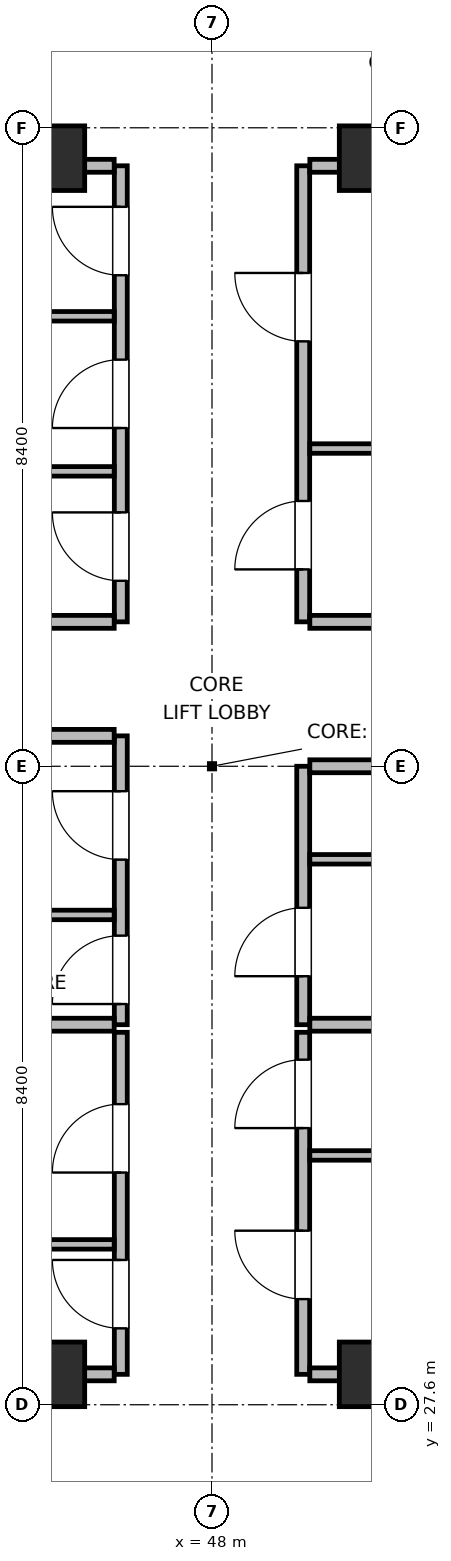
"""IFC4 building model, lengths in metres.
Left out: names, types, materials, properties, quantities, classifications, styles, units other than length and angle.
Written with IfcOpenShell. Run it as: python <this file> out.ifc"""

import sys

from ifc_helpers import new_model, si_unit, direction, frame, frame_2d, origin, origin_2d, place, context, subcontext, project, spatial, rectangle, extrude, element, fill, save


model = new_model("IFC4")
c1 = context("Model", 3, precision=1e-05, world=origin(), true_north=direction((0.0, 1.0)))
c2 = subcontext(c1, "Body", "Model", "MODEL_VIEW")
j1 = project(units=[si_unit("LENGTHUNIT", "METRE"), si_unit("PLANEANGLEUNIT", "RADIAN")], contexts=[c1])
p1 = place(None, origin())
s1 = spatial("IfcSite", under=j1, at=p1, CompositionType="ELEMENT")
p2 = place(p1, origin())
s2 = spatial("IfcBuilding", under=s1, at=p2, CompositionType="ELEMENT")
p3 = place(p2, frame((0.0, 0.0, 270.6)))
s3 = spatial("IfcBuildingStorey", under=s2, at=p3, CompositionType="ELEMENT", Elevation=270.6)
for number, where, z_axis, x_axis in (
    (1, (45.9, 28.0, 0.0), (0.0, 0.0, 1.0), (1.0, 0.0, 0.0)),
    (2, (50.1, 28.0, 0.0), (0.0, 0.0, 1.0), (1.0, 0.0, 0.0)),
    (3, (45.9, 44.0, 0.0), (0.0, 0.0, 1.0), (1.0, 0.0, 0.0)),
    (4, (50.1, 44.0, 0.0), (0.0, 0.0, 1.0), (1.0, 0.0, 0.0)),
):
    element("IfcColumn", number, at=place(p3, frame(where, z_axis=z_axis, x_axis=x_axis)), inside=s3, PredefinedType="COLUMN", context=c2, shape_type="SweptSolid", body=[
        extrude(rectangle(XDim=0.85, YDim=0.85, at=origin_2d()), origin(), (0.0, 0.0, 1.0), 3.9),
    ])
p4 = place(p3, frame((46.8, 32.6, 0.0), z_axis=(0.0, 0.0, 1.0), x_axis=(0.0, 1.0, 0.0)))
e5 = element("IfcWall", 5, at=p4, inside=s3, PredefinedType="PARTITIONING", context=c2, shape_type="SweptSolid", body=[
    extrude(rectangle(XDim=3.8, YDim=0.17, at=frame_2d((1.9, 0.0))), origin(), (0.0, 0.0, 1.0), 3.68),
])
p5 = place(p4, frame((0.272, 0.0, 0.0)))
e6 = element("IfcOpeningElement", 6, at=p5, cuts=e5, PredefinedType="OPENING", context=c2, shape_type="SweptSolid", body=[
    extrude(rectangle(XDim=0.9, YDim=2.02, at=frame_2d((0.45, 1.01))), frame((0.0, 0.095, 0.0), z_axis=(0.0, -1.0, 0.0), x_axis=(1.0, 0.0, 0.0)), (0.0, 0.0, 1.0), 0.19),
])
p6 = place(p4, frame((2.172, 0.0, 0.0)))
e7 = element("IfcOpeningElement", 7, at=p6, cuts=e5, PredefinedType="OPENING", context=c2, shape_type="SweptSolid", body=[
    extrude(rectangle(XDim=0.9, YDim=2.02, at=frame_2d((0.45, 1.01))), frame((0.0, 0.095, 0.0), z_axis=(0.0, -1.0, 0.0), x_axis=(1.0, 0.0, 0.0)), (0.0, 0.0, 1.0), 0.19),
])
for number, where, z_axis, x_axis in (
    (8, (43.8, 32.6, 0.0), (0.0, 0.0, 1.0), (1.0, 0.0, 0.0)),
    (9, (43.8, 36.4, 0.0), (0.0, 0.0, 1.0), (1.0, 0.0, 0.0)),
):
    element("IfcWall", number, at=place(p3, frame(where, z_axis=z_axis, x_axis=x_axis)), inside=s3, PredefinedType="PARTITIONING", context=c2, shape_type="SweptSolid", body=[
        extrude(rectangle(XDim=2.913, YDim=0.17, at=frame_2d((1.457, 0.0))), origin(), (0.0, 0.0, 1.0), 3.68),
    ])
p7 = place(p3, frame((43.8, 34.044, 0.0), z_axis=(0.0, 0.0, 1.0), x_axis=(1.0, 0.0, 0.0)))
e10 = element("IfcWall", 10, at=p7, inside=s3, PredefinedType="PARTITIONING", context=c2, shape_type="SweptSolid", body=[
    extrude(rectangle(XDim=2.913, YDim=0.125, at=frame_2d((1.457, 0.0))), origin(), (0.0, 0.0, 1.0), 3.68),
])
p8 = place(p3, frame((49.2, 32.6, 0.0), z_axis=(0.0, 0.0, 1.0), x_axis=(0.0, 1.0, 0.0)))
e11 = element("IfcWall", 11, at=p8, inside=s3, PredefinedType="PARTITIONING", context=c2, shape_type="SweptSolid", body=[
    extrude(rectangle(XDim=3.4, YDim=0.17, at=frame_2d((1.7, 0.0))), origin(), (0.0, 0.0, 1.0), 3.68),
])
p9 = place(p8, frame((0.638, 0.0, 0.0)))
e12 = element("IfcOpeningElement", 12, at=p9, cuts=e11, PredefinedType="OPENING", context=c2, shape_type="SweptSolid", body=[
    extrude(rectangle(XDim=0.9, YDim=2.02, at=frame_2d((0.45, 1.01))), frame((0.0, 0.095, 0.0), z_axis=(0.0, -1.0, 0.0), x_axis=(1.0, 0.0, 0.0)), (0.0, 0.0, 1.0), 0.19),
])
for number, where, z_axis, x_axis in (
    (13, (49.287, 32.6, 0.0), (0.0, 0.0, 1.0), (1.0, 0.0, 0.0)),
    (14, (49.287, 36.0, 0.0), (0.0, 0.0, 1.0), (1.0, 0.0, 0.0)),
):
    element("IfcWall", number, at=place(p3, frame(where, z_axis=z_axis, x_axis=x_axis)), inside=s3, PredefinedType="PARTITIONING", context=c2, shape_type="SweptSolid", body=[
        extrude(rectangle(XDim=2.913, YDim=0.17, at=frame_2d((1.457, 0.0))), origin(), (0.0, 0.0, 1.0), 3.68),
    ])
p10 = place(p3, frame((49.287, 34.776, 0.0), z_axis=(0.0, 0.0, 1.0), x_axis=(1.0, 0.0, 0.0)))
e15 = element("IfcWall", 15, at=p10, inside=s3, PredefinedType="PARTITIONING", context=c2, shape_type="SweptSolid", body=[
    extrude(rectangle(XDim=2.913, YDim=0.125, at=frame_2d((1.457, 0.0))), origin(), (0.0, 0.0, 1.0), 3.68),
])
p11 = place(p3, frame((46.8, 28.0, 0.0), z_axis=(0.0, 0.0, 1.0), x_axis=(0.0, 1.0, 0.0)))
e16 = element("IfcWall", 16, at=p11, inside=s3, PredefinedType="PARTITIONING", context=c2, shape_type="SweptSolid", body=[
    extrude(rectangle(XDim=4.5, YDim=0.17, at=frame_2d((2.25, 0.0))), origin(), (0.0, 0.0, 1.0), 3.68),
])
p12 = place(p11, frame((0.605, 0.0, 0.0)))
e17 = element("IfcOpeningElement", 17, at=p12, cuts=e16, PredefinedType="OPENING", context=c2, shape_type="SweptSolid", body=[
    extrude(rectangle(XDim=0.9, YDim=2.02, at=frame_2d((0.45, 1.01))), frame((0.0, 0.095, 0.0), z_axis=(0.0, -1.0, 0.0), x_axis=(1.0, 0.0, 0.0)), (0.0, 0.0, 1.0), 0.19),
])
p13 = place(p11, frame((2.655, 0.0, 0.0)))
e18 = element("IfcOpeningElement", 18, at=p13, cuts=e16, PredefinedType="OPENING", context=c2, shape_type="SweptSolid", body=[
    extrude(rectangle(XDim=0.9, YDim=2.02, at=frame_2d((0.45, 1.01))), frame((0.0, 0.095, 0.0), z_axis=(0.0, -1.0, 0.0), x_axis=(1.0, 0.0, 0.0)), (0.0, 0.0, 1.0), 0.19),
])
p14 = place(p3, frame((42.5, 28.0, 0.0), z_axis=(0.0, 0.0, 1.0), x_axis=(1.0, 0.0, 0.0)))
e19 = element("IfcWall", 19, at=p14, inside=s3, PredefinedType="PARTITIONING", context=c2, shape_type="SweptSolid", body=[
    extrude(rectangle(XDim=4.213, YDim=0.17, at=frame_2d((2.106, 0.0))), origin(), (0.0, 0.0, 1.0), 2.765),
])
p15 = place(p3, frame((42.5, 29.71, 0.0), z_axis=(0.0, 0.0, 1.0), x_axis=(1.0, 0.0, 0.0)))
e20 = element("IfcWall", 20, at=p15, inside=s3, PredefinedType="PARTITIONING", context=c2, shape_type="SweptSolid", body=[
    extrude(rectangle(XDim=4.213, YDim=0.125, at=frame_2d((2.106, 0.0))), origin(), (0.0, 0.0, 1.0), 3.68),
])
p16 = place(p3, frame((49.2, 28.0, 0.0), z_axis=(0.0, 0.0, 1.0), x_axis=(0.0, 1.0, 0.0)))
e21 = element("IfcWall", 21, at=p16, inside=s3, PredefinedType="PARTITIONING", context=c2, shape_type="SweptSolid", body=[
    extrude(rectangle(XDim=4.5, YDim=0.17, at=frame_2d((2.25, 0.0))), origin(), (0.0, 0.0, 1.0), 3.68),
])
p17 = place(p16, frame((0.99, 0.0, 0.0)))
e22 = element("IfcOpeningElement", 22, at=p17, cuts=e21, PredefinedType="OPENING", context=c2, shape_type="SweptSolid", body=[
    extrude(rectangle(XDim=0.9, YDim=2.02, at=frame_2d((0.45, 1.01))), frame((0.0, 0.095, 0.0), z_axis=(0.0, -1.0, 0.0), x_axis=(1.0, 0.0, 0.0)), (0.0, 0.0, 1.0), 0.19),
])
p18 = place(p16, frame((3.24, 0.0, 0.0)))
e23 = element("IfcOpeningElement", 23, at=p18, cuts=e21, PredefinedType="OPENING", context=c2, shape_type="SweptSolid", body=[
    extrude(rectangle(XDim=0.9, YDim=2.02, at=frame_2d((0.45, 1.01))), frame((0.0, 0.095, 0.0), z_axis=(0.0, -1.0, 0.0), x_axis=(1.0, 0.0, 0.0)), (0.0, 0.0, 1.0), 0.19),
])
p19 = place(p3, frame((49.287, 28.0, 0.0), z_axis=(0.0, 0.0, 1.0), x_axis=(1.0, 0.0, 0.0)))
e24 = element("IfcWall", 24, at=p19, inside=s3, PredefinedType="PARTITIONING", context=c2, shape_type="SweptSolid", body=[
    extrude(rectangle(XDim=4.213, YDim=0.17, at=frame_2d((2.106, 0.0))), origin(), (0.0, 0.0, 1.0), 2.765),
])
p20 = place(p3, frame((49.287, 30.88, 0.0), z_axis=(0.0, 0.0, 1.0), x_axis=(1.0, 0.0, 0.0)))
e25 = element("IfcWall", 25, at=p20, inside=s3, PredefinedType="PARTITIONING", context=c2, shape_type="SweptSolid", body=[
    extrude(rectangle(XDim=4.213, YDim=0.125, at=frame_2d((2.106, 0.0))), origin(), (0.0, 0.0, 1.0), 3.68),
])
p21 = place(p3, frame((46.8, 37.9, 0.0), z_axis=(0.0, 0.0, 1.0), x_axis=(0.0, 1.0, 0.0)))
e26 = element("IfcWall", 26, at=p21, inside=s3, PredefinedType="PARTITIONING", context=c2, shape_type="SweptSolid", body=[
    extrude(rectangle(XDim=6.0, YDim=0.17, at=frame_2d((3.0, 0.0))), origin(), (0.0, 0.0, 1.0), 3.68),
])
p22 = place(p21, frame((0.54, 0.0, 0.0)))
e27 = element("IfcOpeningElement", 27, at=p22, cuts=e26, PredefinedType="OPENING", context=c2, shape_type="SweptSolid", body=[
    extrude(rectangle(XDim=0.9, YDim=2.02, at=frame_2d((0.45, 1.01))), frame((0.0, 0.095, 0.0), z_axis=(0.0, -1.0, 0.0), x_axis=(1.0, 0.0, 0.0)), (0.0, 0.0, 1.0), 0.19),
])
p23 = place(p21, frame((2.55, 0.0, 0.0)))
e28 = element("IfcOpeningElement", 28, at=p23, cuts=e26, PredefinedType="OPENING", context=c2, shape_type="SweptSolid", body=[
    extrude(rectangle(XDim=0.9, YDim=2.02, at=frame_2d((0.45, 1.01))), frame((0.0, 0.095, 0.0), z_axis=(0.0, -1.0, 0.0), x_axis=(1.0, 0.0, 0.0)), (0.0, 0.0, 1.0), 0.19),
])
p24 = place(p21, frame((4.56, 0.0, 0.0)))
e29 = element("IfcOpeningElement", 29, at=p24, cuts=e26, PredefinedType="OPENING", context=c2, shape_type="SweptSolid", body=[
    extrude(rectangle(XDim=0.9, YDim=2.02, at=frame_2d((0.45, 1.01))), frame((0.0, 0.095, 0.0), z_axis=(0.0, -1.0, 0.0), x_axis=(1.0, 0.0, 0.0)), (0.0, 0.0, 1.0), 0.19),
])
p25 = place(p3, frame((42.5, 37.9, 0.0), z_axis=(0.0, 0.0, 1.0), x_axis=(1.0, 0.0, 0.0)))
e30 = element("IfcWall", 30, at=p25, inside=s3, PredefinedType="PARTITIONING", context=c2, shape_type="SweptSolid", body=[
    extrude(rectangle(XDim=4.213, YDim=0.17, at=frame_2d((2.106, 0.0))), origin(), (0.0, 0.0, 1.0), 3.68),
])
p26 = place(p3, frame((42.5, 43.9, 0.0), z_axis=(0.0, 0.0, 1.0), x_axis=(1.0, 0.0, 0.0)))
e31 = element("IfcWall", 31, at=p26, inside=s3, PredefinedType="PARTITIONING", context=c2, shape_type="SweptSolid", body=[
    extrude(rectangle(XDim=4.213, YDim=0.17, at=frame_2d((2.106, 0.0))), origin(), (0.0, 0.0, 1.0), 2.765),
])
for number, where, z_axis, x_axis in (
    (32, (42.5, 39.88, 0.0), (0.0, 0.0, 1.0), (1.0, 0.0, 0.0)),
    (33, (42.5, 41.92, 0.0), (0.0, 0.0, 1.0), (1.0, 0.0, 0.0)),
):
    element("IfcWall", number, at=place(p3, frame(where, z_axis=z_axis, x_axis=x_axis)), inside=s3, PredefinedType="PARTITIONING", context=c2, shape_type="SweptSolid", body=[
        extrude(rectangle(XDim=4.213, YDim=0.125, at=frame_2d((2.106, 0.0))), origin(), (0.0, 0.0, 1.0), 3.68),
    ])
p27 = place(p3, frame((49.2, 37.9, 0.0), z_axis=(0.0, 0.0, 1.0), x_axis=(0.0, 1.0, 0.0)))
e34 = element("IfcWall", 34, at=p27, inside=s3, PredefinedType="PARTITIONING", context=c2, shape_type="SweptSolid", body=[
    extrude(rectangle(XDim=6.0, YDim=0.17, at=frame_2d((3.0, 0.0))), origin(), (0.0, 0.0, 1.0), 3.68),
])
p28 = place(p27, frame((0.69, 0.0, 0.0)))
e35 = element("IfcOpeningElement", 35, at=p28, cuts=e34, PredefinedType="OPENING", context=c2, shape_type="SweptSolid", body=[
    extrude(rectangle(XDim=0.9, YDim=2.02, at=frame_2d((0.45, 1.01))), frame((0.0, 0.095, 0.0), z_axis=(0.0, -1.0, 0.0), x_axis=(1.0, 0.0, 0.0)), (0.0, 0.0, 1.0), 0.19),
])
p29 = place(p27, frame((3.69, 0.0, 0.0)))
e36 = element("IfcOpeningElement", 36, at=p29, cuts=e34, PredefinedType="OPENING", context=c2, shape_type="SweptSolid", body=[
    extrude(rectangle(XDim=0.9, YDim=2.02, at=frame_2d((0.45, 1.01))), frame((0.0, 0.095, 0.0), z_axis=(0.0, -1.0, 0.0), x_axis=(1.0, 0.0, 0.0)), (0.0, 0.0, 1.0), 0.19),
])
p30 = place(p3, frame((49.287, 37.9, 0.0), z_axis=(0.0, 0.0, 1.0), x_axis=(1.0, 0.0, 0.0)))
e37 = element("IfcWall", 37, at=p30, inside=s3, PredefinedType="PARTITIONING", context=c2, shape_type="SweptSolid", body=[
    extrude(rectangle(XDim=4.113, YDim=0.17, at=frame_2d((2.056, 0.0))), origin(), (0.0, 0.0, 1.0), 3.68),
])
p31 = place(p3, frame((49.287, 43.9, 0.0), z_axis=(0.0, 0.0, 1.0), x_axis=(1.0, 0.0, 0.0)))
e38 = element("IfcWall", 38, at=p31, inside=s3, PredefinedType="PARTITIONING", context=c2, shape_type="SweptSolid", body=[
    extrude(rectangle(XDim=4.113, YDim=0.17, at=frame_2d((2.056, 0.0))), origin(), (0.0, 0.0, 1.0), 2.765),
])
p32 = place(p3, frame((49.287, 40.18, 0.0), z_axis=(0.0, 0.0, 1.0), x_axis=(1.0, 0.0, 0.0)))
e39 = element("IfcWall", 39, at=p32, inside=s3, PredefinedType="PARTITIONING", context=c2, shape_type="SweptSolid", body=[
    extrude(rectangle(XDim=4.113, YDim=0.125, at=frame_2d((2.056, 0.0))), origin(), (0.0, 0.0, 1.0), 3.68),
])
p33 = place(p5, origin())
e40 = element("IfcDoor", 40, at=p33, inside=s3, OperationType="SINGLE_SWING_LEFT", PredefinedType="DOOR", context=c2, shape_type="SweptSolid", body=[
    extrude(rectangle(XDim=0.9, YDim=2.02, at=frame_2d((0.45, 1.01))), frame((0.0, 0.025, 0.0), z_axis=(0.0, -1.0, 0.0), x_axis=(1.0, 0.0, 0.0)), (0.0, 0.0, 1.0), 0.05),
])
fill(e6, e40)
p34 = place(p6, origin())
e41 = element("IfcDoor", 41, at=p34, inside=s3, OperationType="SINGLE_SWING_RIGHT", PredefinedType="DOOR", context=c2, shape_type="SweptSolid", body=[
    extrude(rectangle(XDim=0.9, YDim=2.02, at=frame_2d((0.45, 1.01))), frame((0.0, 0.025, 0.0), z_axis=(0.0, -1.0, 0.0), x_axis=(1.0, 0.0, 0.0)), (0.0, 0.0, 1.0), 0.05),
])
fill(e7, e41)
p35 = place(p9, origin())
e42 = element("IfcDoor", 42, at=p35, inside=s3, OperationType="SINGLE_SWING_LEFT", PredefinedType="DOOR", context=c2, shape_type="SweptSolid", body=[
    extrude(rectangle(XDim=0.9, YDim=2.02, at=frame_2d((0.45, 1.01))), frame((0.0, 0.025, 0.0), z_axis=(0.0, -1.0, 0.0), x_axis=(1.0, 0.0, 0.0)), (0.0, 0.0, 1.0), 0.05),
])
fill(e12, e42)
p36 = place(p12, origin())
e43 = element("IfcDoor", 43, at=p36, inside=s3, OperationType="SINGLE_SWING_RIGHT", PredefinedType="DOOR", context=c2, shape_type="SweptSolid", body=[
    extrude(rectangle(XDim=0.9, YDim=2.02, at=frame_2d((0.45, 1.01))), frame((0.0, 0.025, 0.0), z_axis=(0.0, -1.0, 0.0), x_axis=(1.0, 0.0, 0.0)), (0.0, 0.0, 1.0), 0.05),
])
fill(e17, e43)
p37 = place(p13, origin())
e44 = element("IfcDoor", 44, at=p37, inside=s3, OperationType="SINGLE_SWING_LEFT", PredefinedType="DOOR", context=c2, shape_type="SweptSolid", body=[
    extrude(rectangle(XDim=0.9, YDim=2.02, at=frame_2d((0.45, 1.01))), frame((0.0, 0.025, 0.0), z_axis=(0.0, -1.0, 0.0), x_axis=(1.0, 0.0, 0.0)), (0.0, 0.0, 1.0), 0.05),
])
fill(e18, e44)
p38 = place(p17, origin())
e45 = element("IfcDoor", 45, at=p38, inside=s3, OperationType="SINGLE_SWING_RIGHT", PredefinedType="DOOR", context=c2, shape_type="SweptSolid", body=[
    extrude(rectangle(XDim=0.9, YDim=2.02, at=frame_2d((0.45, 1.01))), frame((0.0, 0.025, 0.0), z_axis=(0.0, -1.0, 0.0), x_axis=(1.0, 0.0, 0.0)), (0.0, 0.0, 1.0), 0.05),
])
fill(e22, e45)
p39 = place(p18, origin())
e46 = element("IfcDoor", 46, at=p39, inside=s3, OperationType="SINGLE_SWING_LEFT", PredefinedType="DOOR", context=c2, shape_type="SweptSolid", body=[
    extrude(rectangle(XDim=0.9, YDim=2.02, at=frame_2d((0.45, 1.01))), frame((0.0, 0.025, 0.0), z_axis=(0.0, -1.0, 0.0), x_axis=(1.0, 0.0, 0.0)), (0.0, 0.0, 1.0), 0.05),
])
fill(e23, e46)
p40 = place(p22, origin())
e47 = element("IfcDoor", 47, at=p40, inside=s3, OperationType="SINGLE_SWING_RIGHT", PredefinedType="DOOR", context=c2, shape_type="SweptSolid", body=[
    extrude(rectangle(XDim=0.9, YDim=2.02, at=frame_2d((0.45, 1.01))), frame((0.0, 0.025, 0.0), z_axis=(0.0, -1.0, 0.0), x_axis=(1.0, 0.0, 0.0)), (0.0, 0.0, 1.0), 0.05),
])
fill(e27, e47)
p41 = place(p23, origin())
e48 = element("IfcDoor", 48, at=p41, inside=s3, OperationType="SINGLE_SWING_LEFT", PredefinedType="DOOR", context=c2, shape_type="SweptSolid", body=[
    extrude(rectangle(XDim=0.9, YDim=2.02, at=frame_2d((0.45, 1.01))), frame((0.0, 0.025, 0.0), z_axis=(0.0, -1.0, 0.0), x_axis=(1.0, 0.0, 0.0)), (0.0, 0.0, 1.0), 0.05),
])
fill(e28, e48)
p42 = place(p24, origin())
e49 = element("IfcDoor", 49, at=p42, inside=s3, OperationType="SINGLE_SWING_RIGHT", PredefinedType="DOOR", context=c2, shape_type="SweptSolid", body=[
    extrude(rectangle(XDim=0.9, YDim=2.02, at=frame_2d((0.45, 1.01))), frame((0.0, 0.025, 0.0), z_axis=(0.0, -1.0, 0.0), x_axis=(1.0, 0.0, 0.0)), (0.0, 0.0, 1.0), 0.05),
])
fill(e29, e49)
p43 = place(p28, origin())
e50 = element("IfcDoor", 50, at=p43, inside=s3, OperationType="SINGLE_SWING_LEFT", PredefinedType="DOOR", context=c2, shape_type="SweptSolid", body=[
    extrude(rectangle(XDim=0.9, YDim=2.02, at=frame_2d((0.45, 1.01))), frame((0.0, 0.025, 0.0), z_axis=(0.0, -1.0, 0.0), x_axis=(1.0, 0.0, 0.0)), (0.0, 0.0, 1.0), 0.05),
])
fill(e35, e50)
p44 = place(p29, origin())
e51 = element("IfcDoor", 51, at=p44, inside=s3, OperationType="SINGLE_SWING_RIGHT", PredefinedType="DOOR", context=c2, shape_type="SweptSolid", body=[
    extrude(rectangle(XDim=0.9, YDim=2.02, at=frame_2d((0.45, 1.01))), frame((0.0, 0.025, 0.0), z_axis=(0.0, -1.0, 0.0), x_axis=(1.0, 0.0, 0.0)), (0.0, 0.0, 1.0), 0.05),
])
fill(e36, e51)
save(model, sys.argv[1])
